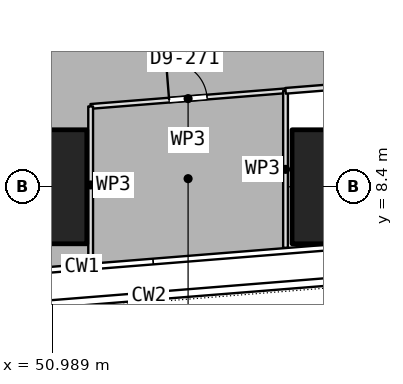
"""IFC4 building model, lengths in metres.
Left out: names, types, materials, properties, quantities, classifications, styles, units other than length and angle.
Written with IfcOpenShell. Run it as: python <this file> out.ifc"""

import sys

from ifc_helpers import new_model, si_unit, direction, frame, frame_2d, origin, origin_2d, place, context, subcontext, project, spatial, rectangle, extrude, element, fill, save


model = new_model("IFC4")
c1 = context("Model", 3, precision=1e-05, world=origin(), true_north=direction((0.0, 1.0)))
c2 = subcontext(c1, "Body", "Model", "MODEL_VIEW")
j1 = project(units=[si_unit("LENGTHUNIT", "METRE"), si_unit("PLANEANGLEUNIT", "RADIAN")], contexts=[c1])
p1 = place(None, origin())
s1 = spatial("IfcSite", under=j1, at=p1, CompositionType="ELEMENT")
p2 = place(p1, origin())
s2 = spatial("IfcBuilding", under=s1, at=p2, CompositionType="ELEMENT")
p3 = place(p2, frame((0.0, 0.0, 77.9)))
s3 = spatial("IfcBuildingStorey", under=s2, at=p3, CompositionType="ELEMENT", Elevation=77.9)
for number, where, z_axis, x_axis in (
    (1, (50.4, 8.4, 0.0), (0.0, 0.0, 1.0), (1.0, 0.0, 0.0)),
    (2, (58.8, 8.4, 0.0), (0.0, 0.0, 1.0), (1.0, 0.0, 0.0)),
):
    element("IfcColumn", number, at=place(p3, frame(where, z_axis=z_axis, x_axis=x_axis)), inside=s3, PredefinedType="COLUMN", context=c2, shape_type="SweptSolid", body=[
        extrude(rectangle(XDim=3.0, YDim=3.0, at=origin_2d()), origin(), (0.0, 0.0, 1.0), 3.75),
    ])
p4 = place(p3, frame((52.001, 10.515, 0.0), z_axis=(0.0, 0.0, 1.0), x_axis=(0.996816485631, 0.079730132159, 0.0)))
e3 = element("IfcWall", 3, at=p4, inside=s3, PredefinedType="PARTITIONING", context=c2, shape_type="SweptSolid", body=[
    extrude(rectangle(XDim=5.144, YDim=0.125, at=frame_2d((2.572, 0.0))), origin(), (0.0, 0.0, 1.0), 3.5),
])
p5 = place(p4, frame((2.072, 0.0, 0.0)))
e4 = element("IfcOpeningElement", 4, at=p5, cuts=e3, PredefinedType="OPENING", context=c2, shape_type="SweptSolid", body=[
    extrude(rectangle(XDim=1.0, YDim=2.1, at=frame_2d((0.5, 1.05))), frame((0.0, 0.073, 0.0), z_axis=(0.0, -1.0, 0.0), x_axis=(1.0, 0.0, 0.0)), (0.0, 0.0, 1.0), 0.145),
])
p6 = place(p3, frame((57.129, 10.925, 0.0), z_axis=(0.0, 0.0, 1.0), x_axis=(0.0, -1.0, 0.0)))
e5 = element("IfcWall", 5, at=p6, inside=s3, PredefinedType="PARTITIONING", context=c2, shape_type="SweptSolid", body=[
    extrude(rectangle(XDim=4.133, YDim=0.125, at=frame_2d((2.066, 0.0))), origin(), (0.0, 0.0, 1.0), 3.5),
])
p7 = place(p3, frame((52.001, 6.381, 0.0), z_axis=(0.0, 0.0, 1.0), x_axis=(0.0, 1.0, 0.0)))
e6 = element("IfcWall", 6, at=p7, inside=s3, PredefinedType="PARTITIONING", context=c2, shape_type="SweptSolid", body=[
    extrude(rectangle(XDim=4.134, YDim=0.125, at=frame_2d((2.067, 0.0))), origin(), (0.0, 0.0, 1.0), 3.5),
])
p8 = place(p3, frame((60.359, 11.184, 0.0), z_axis=(0.0, 0.0, 1.0), x_axis=(-0.996797760889, -0.079963891146, 0.0)))
e7 = element("IfcWall", 7, at=p8, inside=s3, PredefinedType="PARTITIONING", context=c2, shape_type="SweptSolid", body=[
    extrude(rectangle(XDim=3.239, YDim=0.15, at=frame_2d((1.62, 0.0))), origin(), (0.0, 0.0, 1.0), 3.5),
])
p9 = place(p5, origin())
e8 = element("IfcDoor", 8, at=p9, inside=s3, OperationType="SINGLE_SWING_LEFT", PredefinedType="DOOR", context=c2, shape_type="SweptSolid", body=[
    extrude(rectangle(XDim=1.0, YDim=2.1, at=frame_2d((0.5, 1.05))), frame((0.0, 0.025, 0.0), z_axis=(0.0, -1.0, 0.0), x_axis=(1.0, 0.0, 0.0)), (0.0, 0.0, 1.0), 0.05),
])
fill(e4, e8)
save(model, sys.argv[1])
